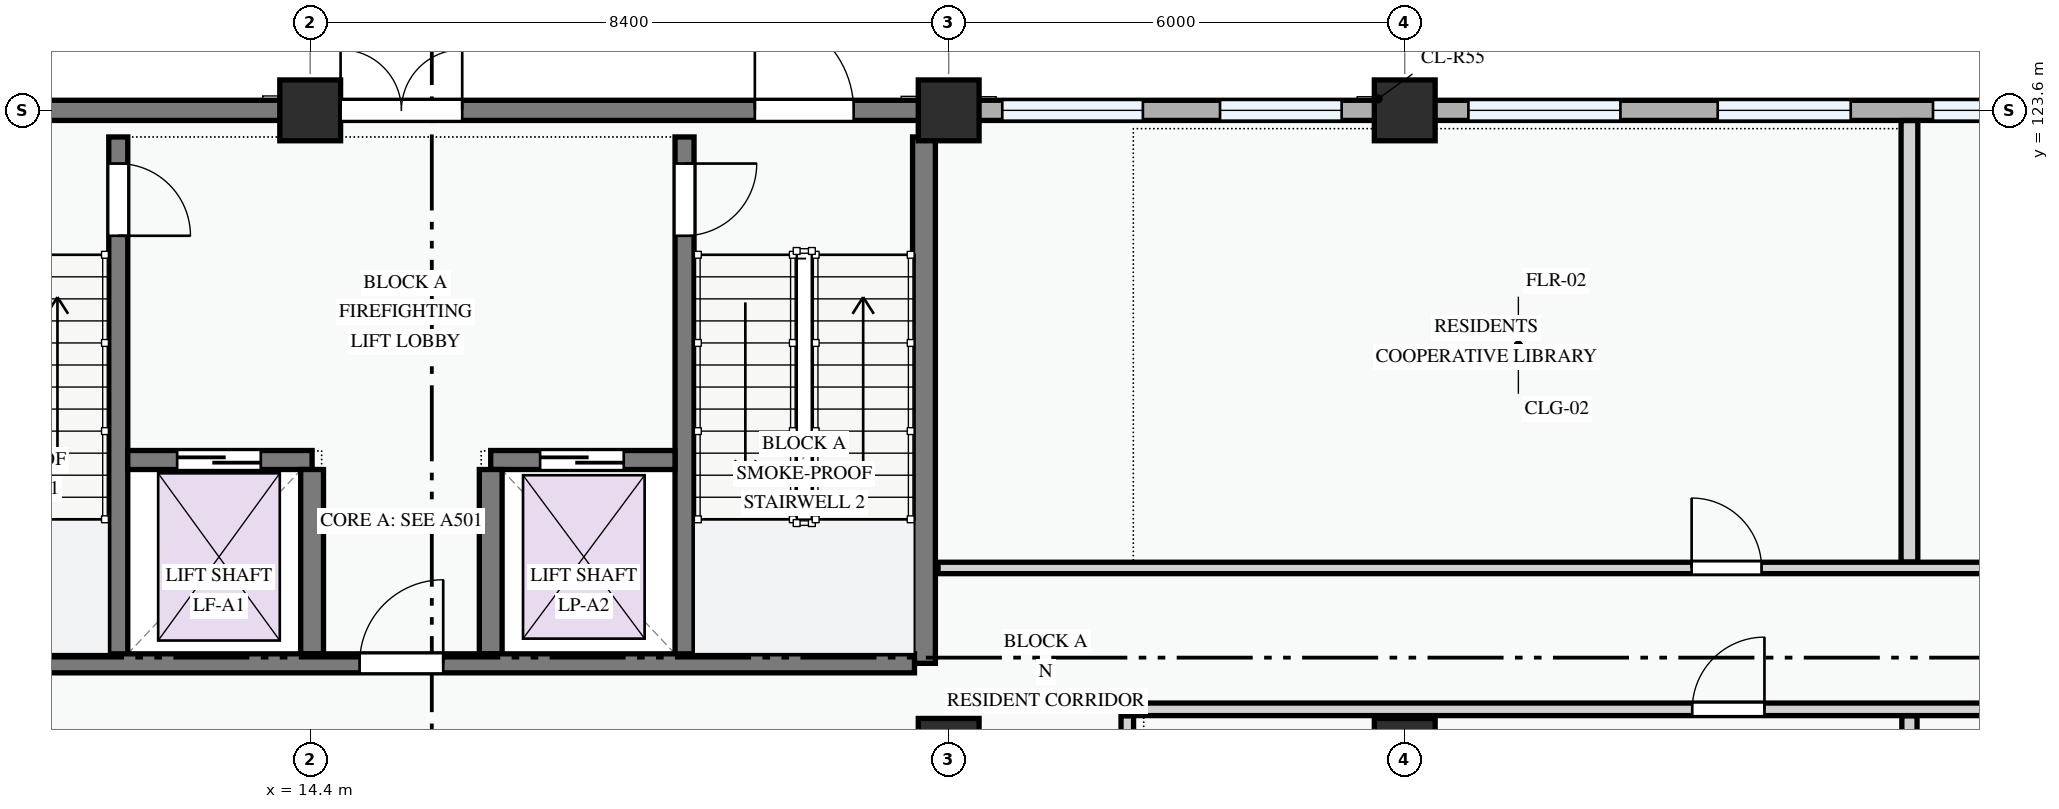
"""IFC4 building model, lengths in metres.
Left out: names, types, materials, properties, quantities, classifications, styles, units other than length and angle.
Written with IfcOpenShell. Run it as: python <this file> out.ifc"""

import sys

from ifc_helpers import new_model, si_unit, direction, frame, frame_2d, origin, origin_2d, place, context, subcontext, project, spatial, rectangle, extrude, element, fill, save


model = new_model("IFC4")
c1 = context("Model", 3, precision=1e-05, world=origin(), true_north=direction((0.0, 1.0)))
c2 = subcontext(c1, "Body", "Model", "MODEL_VIEW")
j1 = project(units=[si_unit("LENGTHUNIT", "METRE"), si_unit("PLANEANGLEUNIT", "RADIAN")], contexts=[c1])
p1 = place(None, origin())
s1 = spatial("IfcSite", under=j1, at=p1, CompositionType="ELEMENT")
p2 = place(p1, origin())
s2 = spatial("IfcBuilding", under=s1, at=p2, CompositionType="ELEMENT")
p3 = place(p2, origin())
s3 = spatial("IfcBuildingStorey", under=s2, at=p3, CompositionType="ELEMENT", Elevation=0.0)
for number, where, z_axis, x_axis in (
    (1, (14.4, 123.6, 0.0), (0.0, 0.0, 1.0), (1.0, 0.0, 0.0)),
    (2, (22.8, 115.2, 0.0), (0.0, 0.0, 1.0), (1.0, 0.0, 0.0)),
    (3, (22.8, 123.6, 0.0), (0.0, 0.0, 1.0), (1.0, 0.0, 0.0)),
    (4, (28.8, 115.2, 0.0), (0.0, 0.0, 1.0), (1.0, 0.0, 0.0)),
    (5, (28.8, 123.6, 0.0), (0.0, 0.0, 1.0), (1.0, 0.0, 0.0)),
):
    element("IfcColumn", number, at=place(p3, frame(where, z_axis=z_axis, x_axis=x_axis)), inside=s3, PredefinedType="COLUMN", context=c2, shape_type="SweptSolid", body=[
        extrude(rectangle(XDim=0.8, YDim=0.8, at=origin_2d()), origin(), (0.0, 0.0, 1.0), 4.5),
    ])
p4 = place(p3, frame((37.2, 123.6, 0.0), z_axis=(0.0, 0.0, 1.0), x_axis=(-1.0, 0.0, 0.0)))
e6 = element("IfcWall", 6, at=p4, inside=s3, PredefinedType="STANDARD", context=c2, shape_type="SweptSolid", body=[
    extrude(rectangle(XDim=8.4, YDim=0.265, at=frame_2d((4.2, 0.0))), origin(), (0.0, 0.0, 1.0), 3.485),
])
p5 = place(p4, frame((0.5, 0.0, 0.78)))
e7 = element("IfcOpeningElement", 7, at=p5, cuts=e6, PredefinedType="OPENING", context=c2, shape_type="SweptSolid", body=[
    extrude(rectangle(XDim=0.95, YDim=1.15, at=frame_2d((0.475, 0.575))), frame((0.0, 0.143, 0.0), z_axis=(0.0, -1.0, 0.0), x_axis=(1.0, 0.0, 0.0)), (0.0, 0.0, 1.0), 0.285),
])
p6 = place(p4, frame((2.532, 0.0, 0.78)))
e8 = element("IfcOpeningElement", 8, at=p6, cuts=e6, PredefinedType="OPENING", context=c2, shape_type="SweptSolid", body=[
    extrude(rectangle(XDim=1.75, YDim=1.45, at=frame_2d((0.875, 0.725))), frame((0.0, 0.143, 0.0), z_axis=(0.0, -1.0, 0.0), x_axis=(1.0, 0.0, 0.0)), (0.0, 0.0, 1.0), 0.285),
])
p7 = place(p4, frame((5.562, 0.0, 0.78)))
e9 = element("IfcOpeningElement", 9, at=p7, cuts=e6, PredefinedType="OPENING", context=c2, shape_type="SweptSolid", body=[
    extrude(rectangle(XDim=2.0, YDim=1.75, at=frame_2d((1.0, 0.875))), frame((0.0, 0.143, 0.0), z_axis=(0.0, -1.0, 0.0), x_axis=(1.0, 0.0, 0.0)), (0.0, 0.0, 1.0), 0.285),
])
p8 = place(p3, frame((28.8, 123.6, 0.0), z_axis=(0.0, 0.0, 1.0), x_axis=(-1.0, 0.0, 0.0)))
e10 = element("IfcWall", 10, at=p8, inside=s3, PredefinedType="STANDARD", context=c2, shape_type="SweptSolid", body=[
    extrude(rectangle(XDim=6.0, YDim=0.265, at=frame_2d((3.0, 0.0))), origin(), (0.0, 0.0, 1.0), 3.585),
])
p9 = place(p8, frame((0.83, 0.0, 0.78)))
e11 = element("IfcOpeningElement", 11, at=p9, cuts=e10, PredefinedType="OPENING", context=c2, shape_type="SweptSolid", body=[
    extrude(rectangle(XDim=1.6, YDim=1.55, at=frame_2d((0.8, 0.775))), frame((0.0, 0.143, 0.0), z_axis=(0.0, -1.0, 0.0), x_axis=(1.0, 0.0, 0.0)), (0.0, 0.0, 1.0), 0.285),
])
p10 = place(p8, frame((3.445, 0.0, 0.78)))
e12 = element("IfcOpeningElement", 12, at=p10, cuts=e10, PredefinedType="OPENING", context=c2, shape_type="SweptSolid", body=[
    extrude(rectangle(XDim=1.85, YDim=1.6, at=frame_2d((0.925, 0.8))), frame((0.0, 0.143, 0.0), z_axis=(0.0, -1.0, 0.0), x_axis=(1.0, 0.0, 0.0)), (0.0, 0.0, 1.0), 0.285),
])
p11 = place(p3, frame((22.8, 123.6, 0.0), z_axis=(0.0, 0.0, 1.0), x_axis=(-1.0, 0.0, 0.0)))
e13 = element("IfcWall", 13, at=p11, inside=s3, PredefinedType="STANDARD", context=c2, shape_type="SweptSolid", body=[
    extrude(rectangle(XDim=8.4, YDim=0.265, at=frame_2d((4.2, 0.0))), origin(), (0.0, 0.0, 1.0), 4.2),
])
p12 = place(p11, frame((6.4, 0.0, 0.0)))
e14 = element("IfcOpeningElement", 14, at=p12, cuts=e13, PredefinedType="OPENING", context=c2, shape_type="SweptSolid", body=[
    extrude(rectangle(XDim=1.6, YDim=2.35, at=frame_2d((0.8, 1.175))), frame((0.0, 0.143, 0.0), z_axis=(0.0, -1.0, 0.0), x_axis=(1.0, 0.0, 0.0)), (0.0, 0.0, 1.0), 0.285),
])
p13 = place(p11, frame((1.25, 0.0, 0.0)))
e15 = element("IfcOpeningElement", 15, at=p13, cuts=e13, PredefinedType="OPENING", context=c2, shape_type="SweptSolid", body=[
    extrude(rectangle(XDim=1.3, YDim=2.2, at=frame_2d((0.65, 1.1))), frame((0.0, 0.143, 0.0), z_axis=(0.0, -1.0, 0.0), x_axis=(1.0, 0.0, 0.0)), (0.0, 0.0, 1.0), 0.285),
])
p14 = place(p3, frame((14.4, 123.6, 0.0), z_axis=(0.0, 0.0, 1.0), x_axis=(-1.0, 0.0, 0.0)))
e16 = element("IfcWall", 16, at=p14, inside=s3, PredefinedType="STANDARD", context=c2, shape_type="SweptSolid", body=[
    extrude(rectangle(XDim=6.0, YDim=0.265, at=frame_2d((3.0, 0.0))), origin(), (0.0, 0.0, 1.0), 4.2),
])
p15 = place(p14, frame((3.5, 0.0, 0.0)))
e17 = element("IfcOpeningElement", 17, at=p15, cuts=e16, PredefinedType="OPENING", context=c2, shape_type="SweptSolid", body=[
    extrude(rectangle(XDim=1.2, YDim=2.2, at=frame_2d((0.6, 1.1))), frame((0.0, 0.143, 0.0), z_axis=(0.0, -1.0, 0.0), x_axis=(1.0, 0.0, 0.0)), (0.0, 0.0, 1.0), 0.285),
])
p16 = place(p3, frame((11.875, 123.25, 0.0), z_axis=(0.0, 0.0, 1.0), x_axis=(0.0, -1.0, 0.0)))
e18 = element("IfcWall", 18, at=p16, inside=s3, PredefinedType="SHEAR", context=c2, shape_type="SweptSolid", body=[
    extrude(rectangle(XDim=6.925, YDim=0.25, at=frame_2d((3.462, 0.0))), origin(), (0.0, 0.0, 1.0), 4.2),
])
p17 = place(p16, frame((0.35, 0.0, 0.0)))
e19 = element("IfcOpeningElement", 19, at=p17, cuts=e18, PredefinedType="OPENING", context=c2, shape_type="SweptSolid", body=[
    extrude(rectangle(XDim=0.95, YDim=2.1, at=frame_2d((0.475, 1.05))), frame((0.0, 0.135, 0.0), z_axis=(0.0, -1.0, 0.0), x_axis=(1.0, 0.0, 0.0)), (0.0, 0.0, 1.0), 0.27),
])
p18 = place(p3, frame((22.475, 123.25, 0.0), z_axis=(0.0, 0.0, 1.0), x_axis=(0.0, -1.0, 0.0)))
e20 = element("IfcWall", 20, at=p18, inside=s3, PredefinedType="SHEAR", context=c2, shape_type="SweptSolid", body=[
    extrude(rectangle(XDim=6.925, YDim=0.3, at=frame_2d((3.462, 0.0))), origin(), (0.0, 0.0, 1.0), 4.2),
])
p19 = place(p3, frame((19.325, 123.25, 0.0), z_axis=(0.0, 0.0, 1.0), x_axis=(0.0, -1.0, 0.0)))
e21 = element("IfcWall", 21, at=p19, inside=s3, PredefinedType="SHEAR", context=c2, shape_type="SweptSolid", body=[
    extrude(rectangle(XDim=6.925, YDim=0.25, at=frame_2d((3.462, 0.0))), origin(), (0.0, 0.0, 1.0), 4.2),
])
p20 = place(p19, frame((0.35, 0.0, 0.0)))
e22 = element("IfcOpeningElement", 22, at=p20, cuts=e21, PredefinedType="OPENING", context=c2, shape_type="SweptSolid", body=[
    extrude(rectangle(XDim=0.95, YDim=2.1, at=frame_2d((0.475, 1.05))), frame((0.0, 0.135, 0.0), z_axis=(0.0, -1.0, 0.0), x_axis=(1.0, 0.0, 0.0)), (0.0, 0.0, 1.0), 0.27),
])
p21 = place(p3, frame((12.0, 119.0, 0.0), z_axis=(0.0, 0.0, 1.0), x_axis=(1.0, 0.0, 0.0)))
e23 = element("IfcWall", 23, at=p21, inside=s3, PredefinedType="SHEAR", context=c2, shape_type="SweptSolid", body=[
    extrude(rectangle(XDim=2.425, YDim=0.25, at=frame_2d((1.212, 0.0))), origin(), (0.0, 0.0, 1.0), 4.2),
])
p22 = place(p21, frame((0.65, 0.0, 0.0)))
e24 = element("IfcOpeningElement", 24, at=p22, cuts=e23, PredefinedType="OPENING", context=c2, shape_type="SweptSolid", body=[
    extrude(rectangle(XDim=1.1, YDim=2.15, at=frame_2d((0.55, 1.075))), frame((0.0, 0.135, 0.0), z_axis=(0.0, -1.0, 0.0), x_axis=(1.0, 0.0, 0.0)), (0.0, 0.0, 1.0), 0.27),
])
p23 = place(p3, frame((16.775, 119.0, 0.0), z_axis=(0.0, 0.0, 1.0), x_axis=(1.0, 0.0, 0.0)))
e25 = element("IfcWall", 25, at=p23, inside=s3, PredefinedType="SHEAR", context=c2, shape_type="SweptSolid", body=[
    extrude(rectangle(XDim=2.425, YDim=0.25, at=frame_2d((1.212, 0.0))), origin(), (0.0, 0.0, 1.0), 4.2),
])
p24 = place(p23, frame((0.65, 0.0, 0.0)))
e26 = element("IfcOpeningElement", 26, at=p24, cuts=e25, PredefinedType="OPENING", context=c2, shape_type="SweptSolid", body=[
    extrude(rectangle(XDim=1.1, YDim=2.15, at=frame_2d((0.55, 1.075))), frame((0.0, 0.135, 0.0), z_axis=(0.0, -1.0, 0.0), x_axis=(1.0, 0.0, 0.0)), (0.0, 0.0, 1.0), 0.27),
])
for number, where, z_axis, x_axis in (
    (27, (14.425, 118.875, 0.0), (0.0, 0.0, 1.0), (0.0, -1.0, 0.0)),
    (28, (16.775, 118.875, 0.0), (0.0, 0.0, 1.0), (0.0, -1.0, 0.0)),
):
    element("IfcWall", number, at=place(p3, frame(where, z_axis=z_axis, x_axis=x_axis)), inside=s3, PredefinedType="SHEAR", context=c2, shape_type="SweptSolid", body=[
        extrude(rectangle(XDim=2.425, YDim=0.3, at=frame_2d((1.212, 0.0))), origin(), (0.0, 0.0, 1.0), 4.2),
    ])
p25 = place(p3, frame((8.85, 116.325, 0.0), z_axis=(0.0, 0.0, 1.0), x_axis=(1.0, 0.0, 0.0)))
e29 = element("IfcWall", 29, at=p25, inside=s3, PredefinedType="SHEAR", context=c2, shape_type="SweptSolid", body=[
    extrude(rectangle(XDim=13.5, YDim=0.25, at=frame_2d((6.75, 0.0))), origin(), (0.0, 0.0, 1.0), 4.2),
])
p26 = place(p25, frame((6.2, 0.0, 0.0)))
e30 = element("IfcOpeningElement", 30, at=p26, cuts=e29, PredefinedType="OPENING", context=c2, shape_type="SweptSolid", body=[
    extrude(rectangle(XDim=1.1, YDim=2.15, at=frame_2d((0.55, 1.075))), frame((0.0, 0.135, 0.0), z_axis=(0.0, -1.0, 0.0), x_axis=(1.0, 0.0, 0.0)), (0.0, 0.0, 1.0), 0.27),
])
p27 = place(p3, frame((25.15, 109.334, 0.0), z_axis=(0.0, 0.0, 1.0), x_axis=(0.0, 1.0, 0.0)))
e31 = element("IfcWall", 31, at=p27, inside=s3, PredefinedType="PARTITIONING", context=c2, shape_type="SweptSolid", body=[
    extrude(rectangle(XDim=6.301, YDim=0.165, at=frame_2d((3.15, 0.0))), origin(), (0.0, 0.0, 1.0), 4.2),
])
p28 = place(p3, frame((35.44, 109.334, 0.0), z_axis=(0.0, 0.0, 1.0), x_axis=(0.0, 1.0, 0.0)))
e32 = element("IfcWall", 32, at=p28, inside=s3, PredefinedType="PARTITIONING", context=c2, shape_type="SweptSolid", body=[
    extrude(rectangle(XDim=6.301, YDim=0.2, at=frame_2d((3.15, 0.0))), origin(), (0.0, 0.0, 1.0), 4.2),
])
p29 = place(p3, frame((35.44, 117.657, 0.0), z_axis=(0.0, 0.0, 1.0), x_axis=(0.0, 1.0, 0.0)))
e33 = element("IfcWall", 33, at=p29, inside=s3, PredefinedType="PARTITIONING", context=c2, shape_type="SweptSolid", body=[
    extrude(rectangle(XDim=5.809, YDim=0.22, at=frame_2d((2.904, 0.0))), origin(), (0.0, 0.0, 1.0), 4.2),
])
p30 = place(p3, frame((25.15, 115.72, 0.0), z_axis=(0.0, 0.0, 1.0), x_axis=(1.0, 0.0, 0.0)))
e34 = element("IfcWall", 34, at=p30, inside=s3, PredefinedType="PARTITIONING", context=c2, shape_type="SweptSolid", body=[
    extrude(rectangle(XDim=32.316, YDim=0.165, at=frame_2d((16.158, 0.0))), origin(), (0.0, 0.0, 1.0), 4.2),
])
p31 = place(p30, frame((7.433, 0.0, 0.0)))
e35 = element("IfcOpeningElement", 35, at=p31, cuts=e34, PredefinedType="OPENING", context=c2, shape_type="SweptSolid", body=[
    extrude(rectangle(XDim=0.95, YDim=2.1, at=frame_2d((0.475, 1.05))), frame((0.0, 0.093, 0.0), z_axis=(0.0, -1.0, 0.0), x_axis=(1.0, 0.0, 0.0)), (0.0, 0.0, 1.0), 0.185),
])
p32 = place(p30, frame((14.586, 0.0, 0.0)))
e36 = element("IfcOpeningElement", 36, at=p32, cuts=e34, PredefinedType="OPENING", context=c2, shape_type="SweptSolid", body=[
    extrude(rectangle(XDim=0.95, YDim=2.1, at=frame_2d((0.475, 1.05))), frame((0.0, 0.093, 0.0), z_axis=(0.0, -1.0, 0.0), x_axis=(1.0, 0.0, 0.0)), (0.0, 0.0, 1.0), 0.185),
])
p33 = place(p30, frame((21.95, 0.0, 0.0)))
e37 = element("IfcOpeningElement", 37, at=p33, cuts=e34, PredefinedType="OPENING", context=c2, shape_type="SweptSolid", body=[
    extrude(rectangle(XDim=0.95, YDim=2.1, at=frame_2d((0.475, 1.05))), frame((0.0, 0.093, 0.0), z_axis=(0.0, -1.0, 0.0), x_axis=(1.0, 0.0, 0.0)), (0.0, 0.0, 1.0), 0.185),
])
p34 = place(p3, frame((22.66, 117.58, 0.0), z_axis=(0.0, 0.0, 1.0), x_axis=(1.0, 0.0, 0.0)))
e38 = element("IfcWall", 38, at=p34, inside=s3, PredefinedType="PARTITIONING", context=c2, shape_type="SweptSolid", body=[
    extrude(rectangle(XDim=34.806, YDim=0.15, at=frame_2d((17.403, 0.0))), origin(), (0.0, 0.0, 1.0), 4.2),
])
p35 = place(p34, frame((9.914, 0.0, 0.0)))
e39 = element("IfcOpeningElement", 39, at=p35, cuts=e38, PredefinedType="OPENING", context=c2, shape_type="SweptSolid", body=[
    extrude(rectangle(XDim=0.92, YDim=2.1, at=frame_2d((0.46, 1.05))), frame((0.0, 0.085, 0.0), z_axis=(0.0, -1.0, 0.0), x_axis=(1.0, 0.0, 0.0)), (0.0, 0.0, 1.0), 0.17),
])
p36 = place(p34, frame((17.072, 0.0, 0.0)))
e40 = element("IfcOpeningElement", 40, at=p36, cuts=e38, PredefinedType="OPENING", context=c2, shape_type="SweptSolid", body=[
    extrude(rectangle(XDim=0.92, YDim=2.1, at=frame_2d((0.46, 1.05))), frame((0.0, 0.085, 0.0), z_axis=(0.0, -1.0, 0.0), x_axis=(1.0, 0.0, 0.0)), (0.0, 0.0, 1.0), 0.17),
])
p37 = place(p34, frame((24.44, 0.0, 0.0)))
e41 = element("IfcOpeningElement", 41, at=p37, cuts=e38, PredefinedType="OPENING", context=c2, shape_type="SweptSolid", body=[
    extrude(rectangle(XDim=0.96, YDim=2.12, at=frame_2d((0.48, 1.06))), frame((0.0, 0.085, 0.0), z_axis=(0.0, -1.0, 0.0), x_axis=(1.0, 0.0, 0.0)), (0.0, 0.0, 1.0), 0.17),
])
p38 = place(p5, origin())
e42 = element("IfcWindow", 42, at=p38, inside=s3, PartitioningType="SINGLE_PANEL", PredefinedType="WINDOW", context=c2, shape_type="SweptSolid", body=[
    extrude(rectangle(XDim=0.95, YDim=1.15, at=frame_2d((0.475, 0.575))), frame((0.0, 0.03, 0.0), z_axis=(0.0, -1.0, 0.0), x_axis=(1.0, 0.0, 0.0)), (0.0, 0.0, 1.0), 0.06),
])
fill(e7, e42)
p39 = place(p6, origin())
e43 = element("IfcWindow", 43, at=p39, inside=s3, PartitioningType="DOUBLE_PANEL_VERTICAL", PredefinedType="WINDOW", context=c2, shape_type="SweptSolid", body=[
    extrude(rectangle(XDim=1.75, YDim=1.45, at=frame_2d((0.875, 0.725))), frame((0.0, 0.03, 0.0), z_axis=(0.0, -1.0, 0.0), x_axis=(1.0, 0.0, 0.0)), (0.0, 0.0, 1.0), 0.06),
])
fill(e8, e43)
p40 = place(p7, origin())
e44 = element("IfcWindow", 44, at=p40, inside=s3, PartitioningType="DOUBLE_PANEL_VERTICAL", PredefinedType="WINDOW", context=c2, shape_type="SweptSolid", body=[
    extrude(rectangle(XDim=2.0, YDim=1.75, at=frame_2d((1.0, 0.875))), frame((0.0, 0.03, 0.0), z_axis=(0.0, -1.0, 0.0), x_axis=(1.0, 0.0, 0.0)), (0.0, 0.0, 1.0), 0.06),
])
fill(e9, e44)
p41 = place(p9, origin())
e45 = element("IfcWindow", 45, at=p41, inside=s3, PartitioningType="DOUBLE_PANEL_VERTICAL", PredefinedType="WINDOW", context=c2, shape_type="SweptSolid", body=[
    extrude(rectangle(XDim=1.6, YDim=1.55, at=frame_2d((0.8, 0.775))), frame((0.0, 0.03, 0.0), z_axis=(0.0, -1.0, 0.0), x_axis=(1.0, 0.0, 0.0)), (0.0, 0.0, 1.0), 0.06),
])
fill(e11, e45)
p42 = place(p10, origin())
e46 = element("IfcWindow", 46, at=p42, inside=s3, PartitioningType="DOUBLE_PANEL_VERTICAL", PredefinedType="WINDOW", context=c2, shape_type="SweptSolid", body=[
    extrude(rectangle(XDim=1.85, YDim=1.6, at=frame_2d((0.925, 0.8))), frame((0.0, 0.03, 0.0), z_axis=(0.0, -1.0, 0.0), x_axis=(1.0, 0.0, 0.0)), (0.0, 0.0, 1.0), 0.06),
])
fill(e12, e46)
p43 = place(p12, frame((1.6, 0.0, 0.0), z_axis=(0.0, 0.0, 1.0), x_axis=(-1.0, 0.0, 0.0)))
e47 = element("IfcDoor", 47, at=p43, inside=s3, OperationType="DOUBLE_DOOR_SINGLE_SWING", PredefinedType="DOOR", context=c2, shape_type="SweptSolid", body=[
    extrude(rectangle(XDim=1.6, YDim=2.35, at=frame_2d((0.8, 1.175))), frame((0.0, 0.025, 0.0), z_axis=(0.0, -1.0, 0.0), x_axis=(1.0, 0.0, 0.0)), (0.0, 0.0, 1.0), 0.05),
])
fill(e14, e47)
p44 = place(p13, frame((1.3, 0.0, 0.0), z_axis=(0.0, 0.0, 1.0), x_axis=(-1.0, 0.0, 0.0)))
e48 = element("IfcDoor", 48, at=p44, inside=s3, OperationType="SINGLE_SWING_LEFT", PredefinedType="DOOR", context=c2, shape_type="SweptSolid", body=[
    extrude(rectangle(XDim=1.3, YDim=2.2, at=frame_2d((0.65, 1.1))), frame((0.0, 0.025, 0.0), z_axis=(0.0, -1.0, 0.0), x_axis=(1.0, 0.0, 0.0)), (0.0, 0.0, 1.0), 0.05),
])
fill(e15, e48)
p45 = place(p17, origin())
e49 = element("IfcDoor", 49, at=p45, inside=s3, OperationType="SINGLE_SWING_RIGHT", PredefinedType="DOOR", context=c2, shape_type="SweptSolid", body=[
    extrude(rectangle(XDim=0.95, YDim=2.1, at=frame_2d((0.475, 1.05))), frame((0.0, 0.025, 0.0), z_axis=(0.0, -1.0, 0.0), x_axis=(1.0, 0.0, 0.0)), (0.0, 0.0, 1.0), 0.05),
])
fill(e19, e49)
p46 = place(p20, origin())
e50 = element("IfcDoor", 50, at=p46, inside=s3, OperationType="SINGLE_SWING_LEFT", PredefinedType="DOOR", context=c2, shape_type="SweptSolid", body=[
    extrude(rectangle(XDim=0.95, YDim=2.1, at=frame_2d((0.475, 1.05))), frame((0.0, 0.025, 0.0), z_axis=(0.0, -1.0, 0.0), x_axis=(1.0, 0.0, 0.0)), (0.0, 0.0, 1.0), 0.05),
])
fill(e22, e50)
p47 = place(p22, origin())
e51 = element("IfcDoor", 51, at=p47, inside=s3, OperationType="SLIDING_TO_LEFT", PredefinedType="DOOR", context=c2, shape_type="SweptSolid", body=[
    extrude(rectangle(XDim=1.1, YDim=2.15, at=frame_2d((0.55, 1.075))), frame((0.0, 0.025, 0.0), z_axis=(0.0, -1.0, 0.0), x_axis=(1.0, 0.0, 0.0)), (0.0, 0.0, 1.0), 0.05),
])
fill(e24, e51)
p48 = place(p24, origin())
e52 = element("IfcDoor", 52, at=p48, inside=s3, OperationType="SLIDING_TO_LEFT", PredefinedType="DOOR", context=c2, shape_type="SweptSolid", body=[
    extrude(rectangle(XDim=1.1, YDim=2.15, at=frame_2d((0.55, 1.075))), frame((0.0, 0.025, 0.0), z_axis=(0.0, -1.0, 0.0), x_axis=(1.0, 0.0, 0.0)), (0.0, 0.0, 1.0), 0.05),
])
fill(e26, e52)
p49 = place(p26, origin())
e53 = element("IfcDoor", 53, at=p49, inside=s3, OperationType="SINGLE_SWING_RIGHT", PredefinedType="DOOR", context=c2, shape_type="SweptSolid", body=[
    extrude(rectangle(XDim=1.1, YDim=2.15, at=frame_2d((0.55, 1.075))), frame((0.0, 0.025, 0.0), z_axis=(0.0, -1.0, 0.0), x_axis=(1.0, 0.0, 0.0)), (0.0, 0.0, 1.0), 0.05),
])
fill(e30, e53)
p50 = place(p31, origin())
e54 = element("IfcDoor", 54, at=p50, inside=s3, OperationType="SINGLE_SWING_RIGHT", PredefinedType="DOOR", context=c2, shape_type="SweptSolid", body=[
    extrude(rectangle(XDim=0.95, YDim=2.1, at=frame_2d((0.475, 1.05))), frame((0.0, 0.025, 0.0), z_axis=(0.0, -1.0, 0.0), x_axis=(1.0, 0.0, 0.0)), (0.0, 0.0, 1.0), 0.05),
])
fill(e35, e54)
p51 = place(p35, origin())
e55 = element("IfcDoor", 55, at=p51, inside=s3, OperationType="SINGLE_SWING_LEFT", PredefinedType="DOOR", context=c2, shape_type="SweptSolid", body=[
    extrude(rectangle(XDim=0.92, YDim=2.1, at=frame_2d((0.46, 1.05))), frame((0.0, 0.025, 0.0), z_axis=(0.0, -1.0, 0.0), x_axis=(1.0, 0.0, 0.0)), (0.0, 0.0, 1.0), 0.05),
])
fill(e39, e55)
save(model, sys.argv[1])
